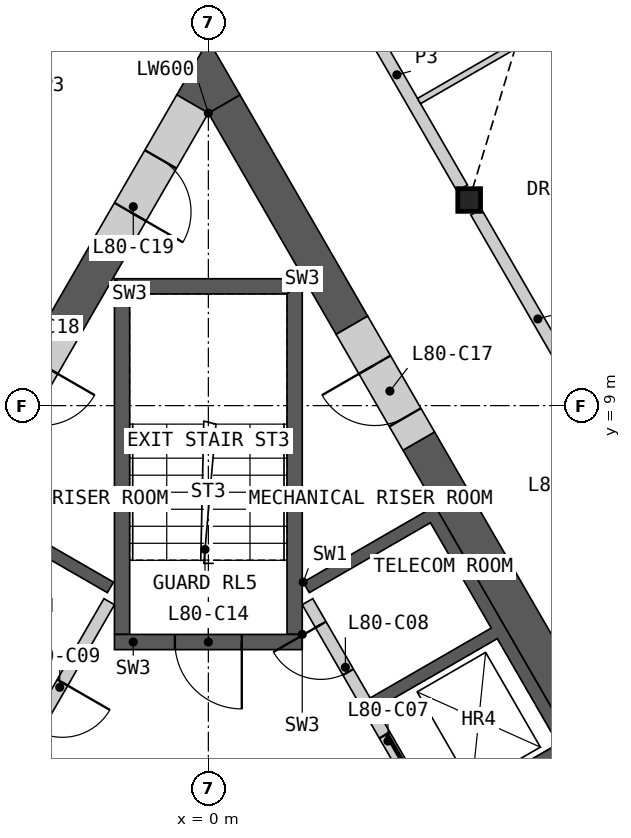
"""IFC4 building model, lengths in metres.
Left out: names, types, materials, properties, quantities, classifications, styles, units other than length and angle.
Written with IfcOpenShell. Run it as: python <this file> out.ifc"""

import sys

from ifc_helpers import new_model, si_unit, direction, frame, frame_2d, origin, origin_2d, place, context, subcontext, project, spatial, polyline, rectangle, i_section, outline, extrude, element, fill, save


model = new_model("IFC4")
c1 = context("Model", 3, precision=1e-05, world=origin(), true_north=direction((0.0, 1.0)))
c2 = subcontext(c1, "Body", "Model", "MODEL_VIEW")
j1 = project(units=[si_unit("LENGTHUNIT", "METRE"), si_unit("PLANEANGLEUNIT", "RADIAN")], contexts=[c1])
p1 = place(None, origin())
s1 = spatial("IfcSite", under=j1, at=p1, CompositionType="ELEMENT")
p2 = place(p1, origin())
s2 = spatial("IfcBuilding", under=s1, at=p2, CompositionType="ELEMENT")
p3 = place(p2, frame((0.0, 0.0, 361.0)))
s3 = spatial("IfcBuildingStorey", under=s2, at=p3, CompositionType="ELEMENT", Elevation=361.0)
p4 = place(p3, frame((4.289, 12.382, 0.0), z_axis=(0.0, 0.0, 1.0), x_axis=(1.0, 0.0, 0.0)))
e1 = element("IfcColumn", 1, at=p4, inside=s3, PredefinedType="COLUMN", context=c2, shape_type="SweptSolid", body=[
    extrude(i_section(OverallWidth=0.374, OverallDepth=0.372, WebThickness=0.016, FlangeThickness=0.026, at=origin_2d()), origin(), (0.0, 0.0, 1.0), 3.4),
])
p5 = place(p3, origin())
e2 = element("IfcWall", 2, at=p5, inside=s3, PredefinedType="SHEAR", context=c2, shape_type="SweptSolid", body=[
    extrude(outline(polyline([(1.561, 6.097), (3.731, 7.35), (8.231, -0.444), (6.061, -1.697), (5.96, -1.524), (7.952, -0.374), (6.952, 1.358), (4.96, 0.208), (4.861, 0.381), (6.852, 1.531), (5.852, 3.263), (3.861, 2.113), (3.76, 2.287), (5.752, 3.437), (4.752, 5.169), (2.76, 4.019), (2.66, 4.192), (4.652, 5.342), (3.652, 7.074), (1.66, 5.924), (1.561, 6.097)])), origin(), (0.0, 0.0, 1.0), 3.1),
])
p6 = place(p3, frame((5.817, -1.476, 0.0), z_axis=(0.0, 0.0, 1.0), x_axis=(-0.500002616675, 0.866023893041, 0.0)))
e3 = element("IfcWall", 3, at=p6, inside=s3, PredefinedType="SOLIDWALL", context=c2, shape_type="SweptSolid", body=[
    extrude(rectangle(XDim=8.373, YDim=0.2, at=frame_2d((4.187, 0.0))), origin(), (0.0, 0.0, 1.0), 3.1),
])
p7 = place(p6, frame((0.337, 0.0, 0.0)))
e4 = element("IfcOpeningElement", 4, at=p7, cuts=e3, PredefinedType="OPENING", context=c2, shape_type="SweptSolid", body=[
    extrude(rectangle(XDim=1.1, YDim=2.1, at=frame_2d((0.55, 1.05))), frame((0.0, 0.11, 0.0), z_axis=(0.0, -1.0, 0.0), x_axis=(1.0, 0.0, 0.0)), (0.0, 0.0, 1.0), 0.22),
])
p8 = place(p6, frame((2.537, 0.0, 0.0)))
e5 = element("IfcOpeningElement", 5, at=p8, cuts=e3, PredefinedType="OPENING", context=c2, shape_type="SweptSolid", body=[
    extrude(rectangle(XDim=1.1, YDim=2.1, at=frame_2d((0.55, 1.05))), frame((0.0, 0.11, 0.0), z_axis=(0.0, -1.0, 0.0), x_axis=(1.0, 0.0, 0.0)), (0.0, 0.0, 1.0), 0.22),
])
p9 = place(p6, frame((4.737, 0.0, 0.0)))
e6 = element("IfcOpeningElement", 6, at=p9, cuts=e3, PredefinedType="OPENING", context=c2, shape_type="SweptSolid", body=[
    extrude(rectangle(XDim=1.1, YDim=2.1, at=frame_2d((0.55, 1.05))), frame((0.0, 0.11, 0.0), z_axis=(0.0, -1.0, 0.0), x_axis=(1.0, 0.0, 0.0)), (0.0, 0.0, 1.0), 0.22),
])
p10 = place(p6, frame((7.037, 0.0, 0.0)))
e7 = element("IfcOpeningElement", 7, at=p10, cuts=e3, PredefinedType="OPENING", context=c2, shape_type="SweptSolid", body=[
    extrude(rectangle(XDim=0.9, YDim=2.1, at=frame_2d((0.45, 1.05))), frame((0.0, 0.11, 0.0), z_axis=(0.0, -1.0, 0.0), x_axis=(1.0, 0.0, 0.0)), (0.0, 0.0, 1.0), 0.22),
])
p11 = place(p3, origin())
e8 = element("IfcWall", 8, at=p11, inside=s3, PredefinedType="SHEAR", context=c2, shape_type="SweptSolid", body=[
    extrude(outline(polyline([(-4.96, 0.208), (-7.131, 1.461), (-3.731, 7.35), (-1.561, 6.097), (-1.66, 5.924), (-3.652, 7.074), (-5.752, 3.437), (-3.76, 2.287), (-3.861, 2.113), (-5.852, 3.263), (-6.852, 1.531), (-4.861, 0.381), (-4.96, 0.208)])), origin(), (0.0, 0.0, 1.0), 3.1),
])
p12 = place(p3, frame((-1.631, 5.776, 0.0), z_axis=(0.0, 0.0, 1.0), x_axis=(-0.499992876559, -0.866029516466, 0.0)))
e9 = element("IfcWall", 9, at=p12, inside=s3, PredefinedType="SOLIDWALL", context=c2, shape_type="SweptSolid", body=[
    extrude(rectangle(XDim=6.486, YDim=0.2, at=frame_2d((3.243, 0.0))), origin(), (0.0, 0.0, 1.0), 3.1),
])
p13 = place(p12, frame((1.537, 0.0, 0.0)))
e10 = element("IfcOpeningElement", 10, at=p13, cuts=e9, PredefinedType="OPENING", context=c2, shape_type="SweptSolid", body=[
    extrude(rectangle(XDim=0.9, YDim=2.1, at=frame_2d((0.45, 1.05))), frame((0.0, 0.11, 0.0), z_axis=(0.0, -1.0, 0.0), x_axis=(1.0, 0.0, 0.0)), (0.0, 0.0, 1.0), 0.22),
])
p14 = place(p12, frame((4.837, 0.0, 0.0)))
e11 = element("IfcOpeningElement", 11, at=p14, cuts=e9, PredefinedType="OPENING", context=c2, shape_type="SweptSolid", body=[
    extrude(rectangle(XDim=0.9, YDim=2.1, at=frame_2d((0.45, 1.05))), frame((0.0, 0.11, 0.0), z_axis=(0.0, -1.0, 0.0), x_axis=(1.0, 0.0, 0.0)), (0.0, 0.0, 1.0), 0.22),
])
p15 = place(p3, origin())
e12 = element("IfcWall", 12, at=p15, inside=s3, PredefinedType="SHEAR", context=c2, shape_type="SweptSolid", body=[
    extrude(outline(polyline([(1.544, 5.237), (1.544, 11.087), (1.294, 10.837), (1.294, 5.237), (1.544, 5.237)])), origin(), (0.0, 0.0, 1.0), 3.1),
])
p16 = place(p3, origin())
e13 = element("IfcWall", 13, at=p16, inside=s3, PredefinedType="SHEAR", context=c2, shape_type="SweptSolid", body=[
    extrude(outline(polyline([(1.544, 11.087), (-1.544, 11.087), (-1.294, 10.837), (1.294, 10.837), (1.544, 11.087)])), origin(), (0.0, 0.0, 1.0), 3.1),
])
p17 = place(p3, origin())
e14 = element("IfcWall", 14, at=p17, inside=s3, PredefinedType="SHEAR", context=c2, shape_type="SweptSolid", body=[
    extrude(outline(polyline([(-1.294, 10.837), (-1.544, 11.087), (-1.544, 5.237), (-1.294, 5.237), (-1.294, 10.837)])), origin(), (0.0, 0.0, 1.0), 3.1),
])
p18 = place(p3, frame((1.544, 5.112, 0.0), z_axis=(0.0, 0.0, 1.0), x_axis=(-1.0, 0.0, 0.0)))
e15 = element("IfcWall", 15, at=p18, inside=s3, PredefinedType="SHEAR", context=c2, shape_type="SweptSolid", body=[
    extrude(rectangle(XDim=3.088, YDim=0.25, at=frame_2d((1.544, 0.0))), origin(), (0.0, 0.0, 1.0), 3.1),
])
p19 = place(p18, frame((0.994, 0.0, 0.0)))
e16 = element("IfcOpeningElement", 16, at=p19, cuts=e15, PredefinedType="OPENING", context=c2, shape_type="SweptSolid", body=[
    extrude(rectangle(XDim=1.1, YDim=2.1, at=frame_2d((0.55, 1.05))), frame((0.0, 0.135, 0.0), z_axis=(0.0, -1.0, 0.0), x_axis=(1.0, 0.0, 0.0)), (0.0, 0.0, 1.0), 0.27),
])
p20 = place(p3, frame((8.686, -0.634, 0.0), z_axis=(0.0, 0.0, 1.0), x_axis=(-0.50001836461, 0.866014800712, 0.0)))
e17 = element("IfcWall", 17, at=p20, inside=s3, PredefinedType="SHEAR", context=c2, shape_type="SweptSolid", body=[
    extrude(rectangle(XDim=10.451, YDim=0.6, at=frame_2d((5.225, 0.0))), origin(), (0.0, 0.0, 1.0), 3.1),
])
p21 = place(p3, frame((2.361, 10.322, 0.0), z_axis=(0.0, 0.0, 1.0), x_axis=(-0.500000735859, 0.866024978935, 0.0)))
e18 = element("IfcWall", 18, at=p21, inside=s3, PredefinedType="SHEAR", context=c2, shape_type="SweptSolid", body=[
    extrude(rectangle(XDim=4.202, YDim=0.6, at=frame_2d((2.101, 0.0))), origin(), (0.0, 0.0, 1.0), 3.1),
])
p22 = place(p3, frame((-1.59, 11.658, 0.0), z_axis=(0.0, 0.0, 1.0), x_axis=(-0.500037594623, -0.866003697431, 0.0)))
e19 = element("IfcWall", 19, at=p22, inside=s3, PredefinedType="SHEAR", context=c2, shape_type="SweptSolid", body=[
    extrude(rectangle(XDim=1.542, YDim=0.6, at=frame_2d((0.771, 0.0))), origin(), (0.0, 0.0, 1.0), 3.1),
])
p23 = place(p3, origin())
e20 = element("IfcWall", 20, at=p23, inside=s3, PredefinedType="SHEAR", context=c2, shape_type="SweptSolid", body=[
    extrude(outline(polyline([(0.0, 13.811), (-0.52, 14.111), (0.0, 15.011), (0.52, 14.111), (0.0, 13.811)])), origin(), (0.0, 0.0, 1.0), 3.1),
])
p24 = place(p3, frame((3.461, 8.417, 0.0), z_axis=(0.0, 0.0, 1.0), x_axis=(-0.499946605688, 0.86605622881, 0.0)))
e21 = element("IfcWall", 21, at=p24, inside=s3, PredefinedType="SHEAR", context=c2, shape_type="SweptSolid", body=[
    extrude(rectangle(XDim=2.2, YDim=0.6, at=frame_2d((1.1, 0.0))), origin(), (0.0, 0.0, 1.0), 3.1),
])
p25 = place(p24, frame((0.45, 0.0, 0.0)))
e22 = element("IfcOpeningElement", 22, at=p25, cuts=e21, PredefinedType="OPENING", context=c2, shape_type="SweptSolid", body=[
    extrude(rectangle(XDim=1.0, YDim=2.1, at=frame_2d((0.5, 1.05))), frame((0.0, 0.31, 0.0), z_axis=(0.0, -1.0, 0.0), x_axis=(1.0, 0.0, 0.0)), (0.0, 0.0, 1.0), 0.62),
])
p26 = place(p3, frame((-2.361, 10.322, 0.0), z_axis=(0.0, 0.0, 1.0), x_axis=(-0.499946605688, -0.86605622881, 0.0)))
e23 = element("IfcWall", 23, at=p26, inside=s3, PredefinedType="SHEAR", context=c2, shape_type="SweptSolid", body=[
    extrude(rectangle(XDim=2.2, YDim=0.6, at=frame_2d((1.1, 0.0))), origin(), (0.0, 0.0, 1.0), 3.1),
])
p27 = place(p26, frame((0.75, 0.0, 0.0)))
e24 = element("IfcOpeningElement", 24, at=p27, cuts=e23, PredefinedType="OPENING", context=c2, shape_type="SweptSolid", body=[
    extrude(rectangle(XDim=1.0, YDim=2.1, at=frame_2d((0.5, 1.05))), frame((0.0, 0.31, 0.0), z_axis=(0.0, -1.0, 0.0), x_axis=(1.0, 0.0, 0.0)), (0.0, 0.0, 1.0), 0.62),
])
p28 = place(p3, frame((-0.26, 13.961, 0.0), z_axis=(0.0, 0.0, 1.0), x_axis=(-0.49997936161, -0.866037319036, 0.0)))
e25 = element("IfcWall", 25, at=p28, inside=s3, PredefinedType="SHEAR", context=c2, shape_type="SweptSolid", body=[
    extrude(rectangle(XDim=2.66, YDim=0.6, at=frame_2d((1.33, 0.0))), origin(), (0.0, 0.0, 1.0), 3.1),
])
p29 = place(p28, frame((1.05, 0.0, 0.0)))
e26 = element("IfcOpeningElement", 26, at=p29, cuts=e25, PredefinedType="OPENING", context=c2, shape_type="SweptSolid", body=[
    extrude(rectangle(XDim=1.0, YDim=2.1, at=frame_2d((0.5, 1.05))), frame((0.0, 0.31, 0.0), z_axis=(0.0, -1.0, 0.0), x_axis=(1.0, 0.0, 0.0)), (0.0, 0.0, 1.0), 0.62),
])
p30 = place(p3, frame((4.403, 12.185, 0.0), z_axis=(0.0, 0.0, 1.0), x_axis=(0.499992155518, -0.866029932751, 0.0)))
e27 = element("IfcWall", 27, at=p30, inside=s3, PredefinedType="PARTITIONING", context=c2, shape_type="SweptSolid", body=[
    extrude(rectangle(XDim=8.123, YDim=0.2, at=frame_2d((4.062, 0.0))), origin(), (0.0, 0.0, 1.0), 3.1),
])
p31 = place(p30, frame((3.762, 0.0, 0.0)))
e28 = element("IfcOpeningElement", 28, at=p31, cuts=e27, PredefinedType="OPENING", context=c2, shape_type="SweptSolid", body=[
    extrude(rectangle(XDim=1.0, YDim=2.1, at=frame_2d((0.5, 1.05))), frame((0.0, 0.11, 0.0), z_axis=(0.0, -1.0, 0.0), x_axis=(1.0, 0.0, 0.0)), (0.0, 0.0, 1.0), 0.22),
])
p32 = place(p3, frame((2.025, 16.303, 0.0), z_axis=(0.0, 0.0, 1.0), x_axis=(0.500004215162, -0.866022970146, 0.0)))
e29 = element("IfcWall", 29, at=p32, inside=s3, PredefinedType="PARTITIONING", context=c2, shape_type="SweptSolid", body=[
    extrude(rectangle(XDim=4.3, YDim=0.2, at=frame_2d((2.15, 0.0))), origin(), (0.0, 0.0, 1.0), 3.1),
])
p33 = place(p3, frame((-4.176, 12.579, 0.0), z_axis=(0.0, 0.0, 1.0), x_axis=(0.499974648164, 0.866040040179, 0.0)))
e30 = element("IfcWall", 30, at=p33, inside=s3, PredefinedType="PARTITIONING", context=c2, shape_type="SweptSolid", body=[
    extrude(rectangle(XDim=4.525, YDim=0.2, at=frame_2d((2.263, 0.0))), origin(), (0.0, 0.0, 1.0), 3.1),
])
p34 = place(p3, frame((3.465, 14.01, 0.0), z_axis=(0.0, 0.0, 1.0), x_axis=(0.866032376801, 0.499987922186, 0.0)))
e31 = element("IfcWall", 31, at=p34, inside=s3, PredefinedType="PARTITIONING", context=c2, shape_type="SweptSolid", body=[
    extrude(rectangle(XDim=11.782, YDim=0.1, at=frame_2d((5.891, 0.0))), origin(), (0.0, 0.0, 1.0), 2.33),
])
p35 = place(p34, frame((6.67, 0.0, 0.0)))
e32 = element("IfcOpeningElement", 32, at=p35, cuts=e31, PredefinedType="OPENING", context=c2, shape_type="SweptSolid", body=[
    extrude(rectangle(XDim=0.95, YDim=2.1, at=frame_2d((0.475, 1.05))), frame((0.0, 0.06, 0.0), z_axis=(0.0, -1.0, 0.0), x_axis=(1.0, 0.0, 0.0)), (0.0, 0.0, 1.0), 0.12),
])
p36 = place(p9, origin())
e33 = element("IfcDoor", 33, at=p36, inside=s3, OperationType="SLIDING_TO_LEFT", PredefinedType="DOOR", context=c2, shape_type="SweptSolid", body=[
    extrude(rectangle(XDim=1.1, YDim=2.1, at=frame_2d((0.55, 1.05))), frame((0.0, 0.025, 0.0), z_axis=(0.0, -1.0, 0.0), x_axis=(1.0, 0.0, 0.0)), (0.0, 0.0, 1.0), 0.05),
])
fill(e6, e33)
p37 = place(p10, origin())
e34 = element("IfcDoor", 34, at=p37, inside=s3, OperationType="SINGLE_SWING_RIGHT", PredefinedType="DOOR", context=c2, shape_type="SweptSolid", body=[
    extrude(rectangle(XDim=0.9, YDim=2.1, at=frame_2d((0.45, 1.05))), frame((0.0, 0.025, 0.0), z_axis=(0.0, -1.0, 0.0), x_axis=(1.0, 0.0, 0.0)), (0.0, 0.0, 1.0), 0.05),
])
fill(e7, e34)
p38 = place(p13, origin())
e35 = element("IfcDoor", 35, at=p38, inside=s3, OperationType="SINGLE_SWING_LEFT", PredefinedType="DOOR", context=c2, shape_type="SweptSolid", body=[
    extrude(rectangle(XDim=0.9, YDim=2.1, at=frame_2d((0.45, 1.05))), frame((0.0, 0.025, 0.0), z_axis=(0.0, -1.0, 0.0), x_axis=(1.0, 0.0, 0.0)), (0.0, 0.0, 1.0), 0.05),
])
fill(e10, e35)
p39 = place(p19, origin())
e36 = element("IfcDoor", 36, at=p39, inside=s3, OperationType="SINGLE_SWING_LEFT", PredefinedType="DOOR", context=c2, shape_type="SweptSolid", body=[
    extrude(rectangle(XDim=1.1, YDim=2.1, at=frame_2d((0.55, 1.05))), frame((0.0, 0.025, 0.0), z_axis=(0.0, -1.0, 0.0), x_axis=(1.0, 0.0, 0.0)), (0.0, 0.0, 1.0), 0.05),
])
fill(e16, e36)
p40 = place(p25, origin())
e37 = element("IfcDoor", 37, at=p40, inside=s3, OperationType="SINGLE_SWING_RIGHT", PredefinedType="DOOR", context=c2, shape_type="SweptSolid", body=[
    extrude(rectangle(XDim=1.0, YDim=2.1, at=frame_2d((0.5, 1.05))), frame((0.0, 0.055, 0.0), z_axis=(0.0, -1.0, 0.0), x_axis=(1.0, 0.0, 0.0)), (0.0, 0.0, 1.0), 0.05),
])
fill(e22, e37)
p41 = place(p29, origin())
e38 = element("IfcDoor", 38, at=p41, inside=s3, OperationType="SINGLE_SWING_RIGHT", PredefinedType="DOOR", context=c2, shape_type="SweptSolid", body=[
    extrude(rectangle(XDim=1.0, YDim=2.1, at=frame_2d((0.5, 1.05))), frame((0.0, 0.055, 0.0), z_axis=(0.0, -1.0, 0.0), x_axis=(1.0, 0.0, 0.0)), (0.0, 0.0, 1.0), 0.05),
])
fill(e26, e38)
save(model, sys.argv[1])
